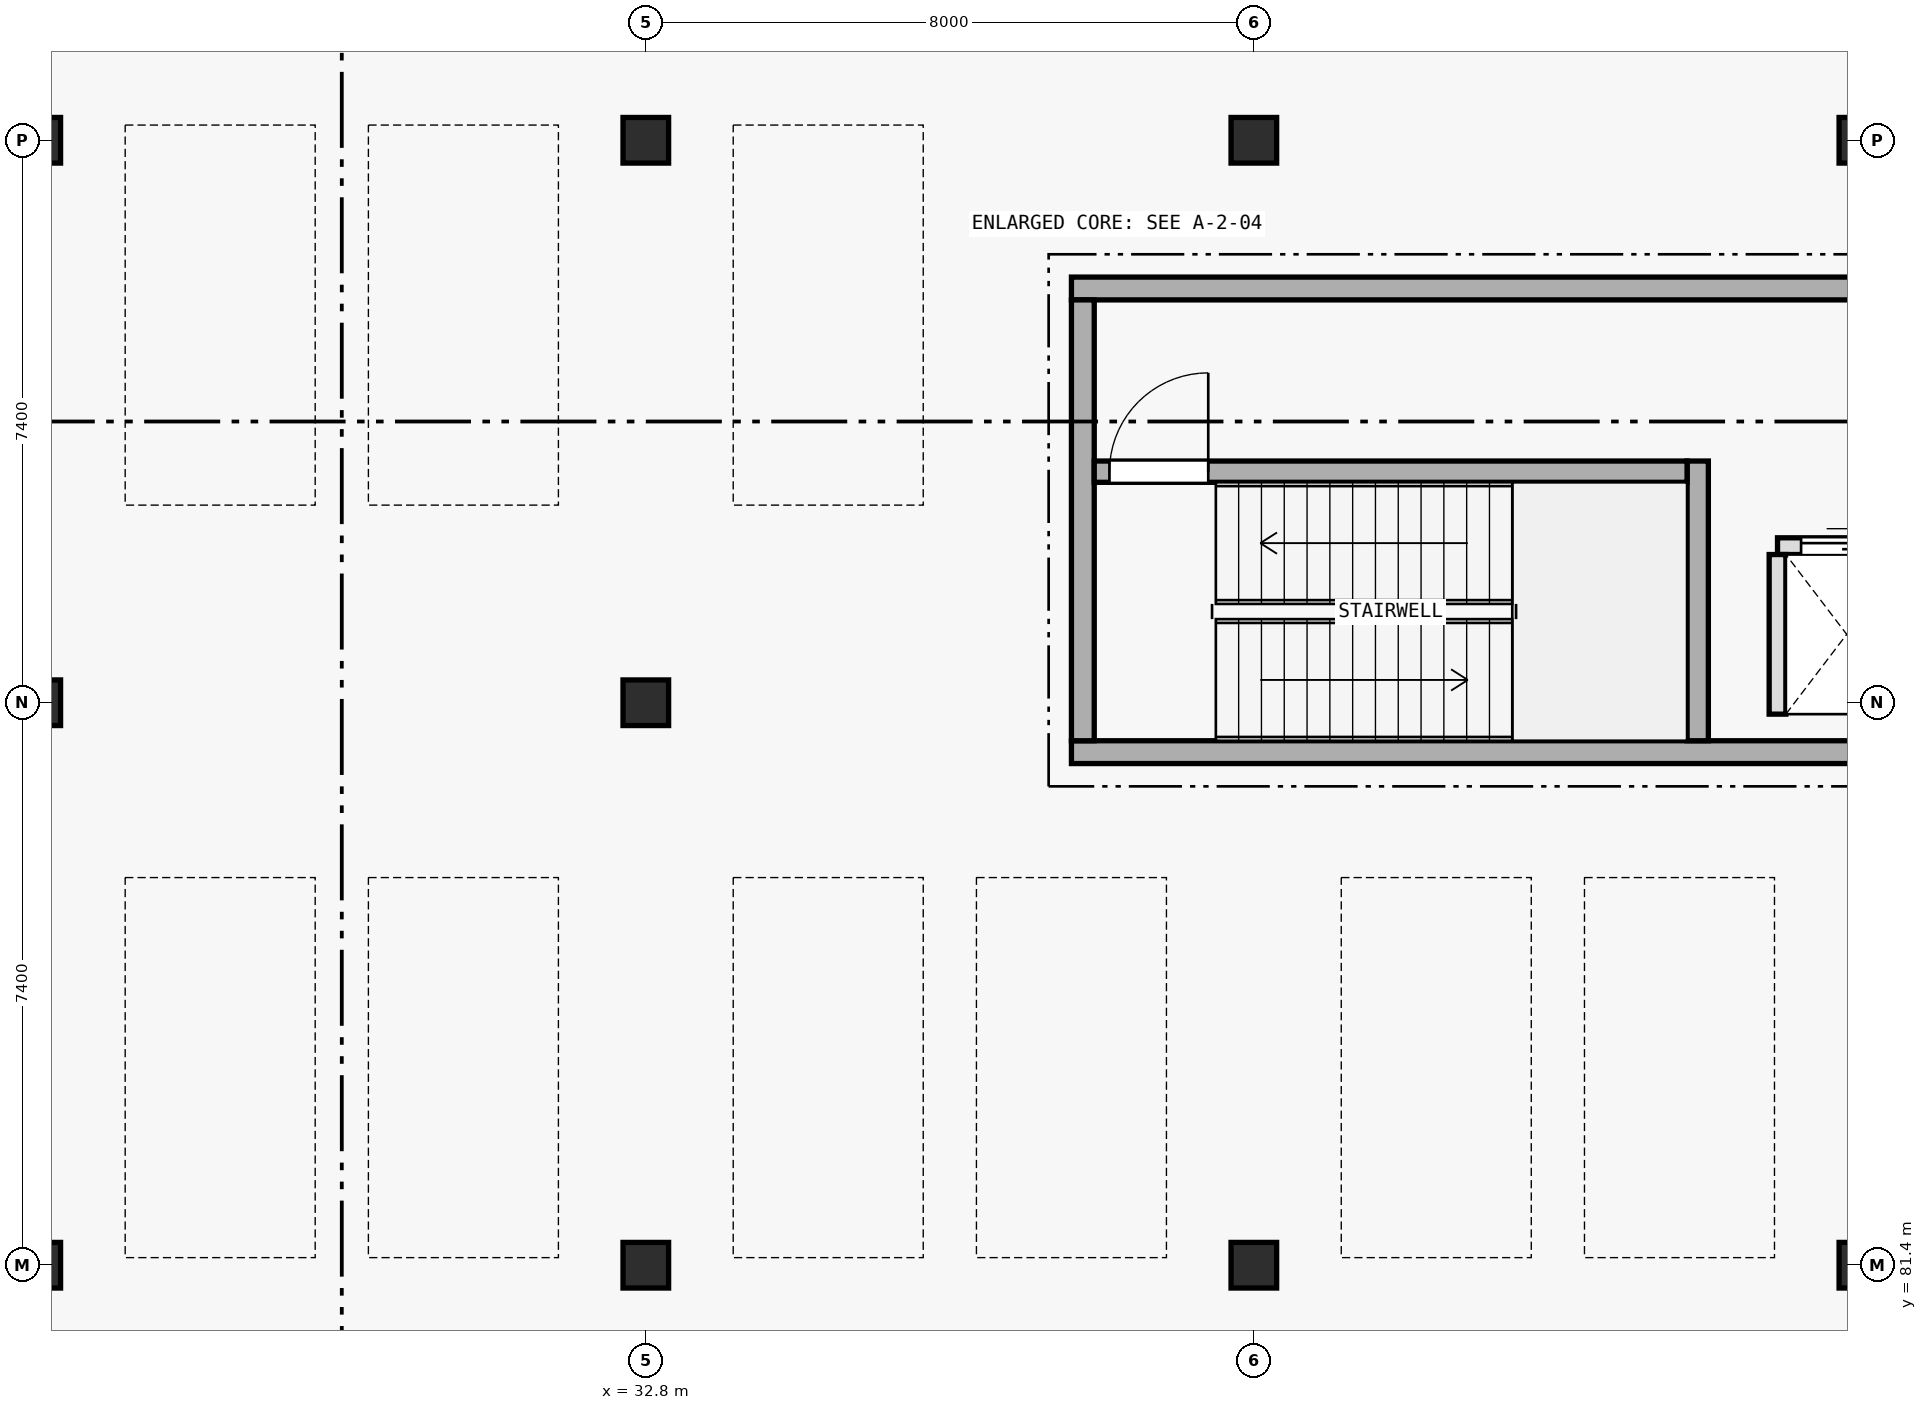
"""IFC4 building model, lengths in metres.
Left out: names, types, materials, properties, quantities, classifications, styles, units other than length and angle.
Written with IfcOpenShell. Run it as: python <this file> out.ifc"""

import sys

from ifc_helpers import new_model, si_unit, direction, frame, frame_2d, origin, origin_2d, place, context, subcontext, project, spatial, rectangle, extrude, element, fill, save


model = new_model("IFC4")
c1 = context("Model", 3, precision=1e-05, world=origin(), true_north=direction((0.0, 1.0)))
c2 = subcontext(c1, "Body", "Model", "MODEL_VIEW")
j1 = project(units=[si_unit("LENGTHUNIT", "METRE"), si_unit("PLANEANGLEUNIT", "RADIAN")], contexts=[c1])
p1 = place(None, origin())
s1 = spatial("IfcSite", under=j1, at=p1, CompositionType="ELEMENT")
p2 = place(p1, origin())
s2 = spatial("IfcBuilding", under=s1, at=p2, CompositionType="ELEMENT")
p3 = place(p2, frame((0.0, 0.0, -4.8)))
s3 = spatial("IfcBuildingStorey", under=s2, at=p3, CompositionType="ELEMENT", Elevation=-4.8)
p4 = place(p3, frame((38.4, 88.15, 0.0), z_axis=(0.0, 0.0, 1.0), x_axis=(1.0, 0.0, 0.0)))
e1 = element("IfcWall", 1, at=p4, inside=s3, PredefinedType="SHEAR", context=c2, shape_type="SweptSolid", body=[
    extrude(rectangle(XDim=16.0, YDim=0.3, at=frame_2d((8.0, 0.0))), origin(), (0.0, 0.0, 1.0), 4.795),
])
p5 = place(p4, frame((13.0, 0.0, 0.0)))
e2 = element("IfcOpeningElement", 2, at=p5, cuts=e1, PredefinedType="OPENING", context=c2, shape_type="SweptSolid", body=[
    extrude(rectangle(XDim=1.3, YDim=2.2, at=frame_2d((0.65, 1.1))), frame((0.0, 0.16, 0.0), z_axis=(0.0, -1.0, 0.0), x_axis=(1.0, 0.0, 0.0)), (0.0, 0.0, 1.0), 0.32),
])
p6 = place(p3, frame((38.4, 94.25, 0.0), z_axis=(0.0, 0.0, 1.0), x_axis=(1.0, 0.0, 0.0)))
e3 = element("IfcWall", 3, at=p6, inside=s3, PredefinedType="SHEAR", context=c2, shape_type="SweptSolid", body=[
    extrude(rectangle(XDim=16.0, YDim=0.3, at=frame_2d((8.0, 0.0))), origin(), (0.0, 0.0, 1.0), 4.795),
])
p7 = place(p3, frame((38.55, 88.3, 0.0), z_axis=(0.0, 0.0, 1.0), x_axis=(0.0, 1.0, 0.0)))
e4 = element("IfcWall", 4, at=p7, inside=s3, PredefinedType="SHEAR", context=c2, shape_type="SweptSolid", body=[
    extrude(rectangle(XDim=5.8, YDim=0.3, at=frame_2d((2.9, 0.0))), origin(), (0.0, 0.0, 1.0), 4.795),
])
p8 = place(p3, frame((46.64, 88.3, 0.0), z_axis=(0.0, 0.0, 1.0), x_axis=(0.0, 1.0, 0.0)))
e5 = element("IfcWall", 5, at=p8, inside=s3, PredefinedType="SHEAR", context=c2, shape_type="SweptSolid", body=[
    extrude(rectangle(XDim=3.68, YDim=0.28, at=frame_2d((1.84, 0.0))), origin(), (0.0, 0.0, 1.0), 4.795),
])
p9 = place(p3, frame((38.7, 91.84, 0.0), z_axis=(0.0, 0.0, 1.0), x_axis=(1.0, 0.0, 0.0)))
e6 = element("IfcWall", 6, at=p9, inside=s3, PredefinedType="SHEAR", context=c2, shape_type="SweptSolid", body=[
    extrude(rectangle(XDim=7.8, YDim=0.28, at=frame_2d((3.9, 0.0))), origin(), (0.0, 0.0, 1.0), 4.795),
])
p10 = place(p9, frame((0.2, 0.0, 0.0)))
e7 = element("IfcOpeningElement", 7, at=p10, cuts=e6, PredefinedType="OPENING", context=c2, shape_type="SweptSolid", body=[
    extrude(rectangle(XDim=1.3, YDim=2.2, at=frame_2d((0.65, 1.1))), frame((0.0, 0.15, 0.0), z_axis=(0.0, -1.0, 0.0), x_axis=(1.0, 0.0, 0.0)), (0.0, 0.0, 1.0), 0.3),
])
for number, where, z_axis, x_axis in (
    (8, (24.8, 81.4, 0.0), (0.0, 0.0, 1.0), (1.0, 0.0, 0.0)),
    (9, (24.8, 88.8, 0.0), (0.0, 0.0, 1.0), (1.0, 0.0, 0.0)),
    (10, (24.8, 96.2, 0.0), (0.0, 0.0, 1.0), (1.0, 0.0, 0.0)),
    (11, (32.8, 81.4, 0.0), (0.0, 0.0, 1.0), (1.0, 0.0, 0.0)),
    (12, (32.8, 88.8, 0.0), (0.0, 0.0, 1.0), (1.0, 0.0, 0.0)),
    (13, (32.8, 96.2, 0.0), (0.0, 0.0, 1.0), (1.0, 0.0, 0.0)),
    (14, (40.8, 81.4, 0.0), (0.0, 0.0, 1.0), (1.0, 0.0, 0.0)),
    (15, (40.8, 96.2, 0.0), (0.0, 0.0, 1.0), (1.0, 0.0, 0.0)),
    (16, (48.8, 81.4, 0.0), (0.0, 0.0, 1.0), (1.0, 0.0, 0.0)),
    (17, (48.8, 96.2, 0.0), (0.0, 0.0, 1.0), (1.0, 0.0, 0.0)),
):
    element("IfcColumn", number, at=place(p3, frame(where, z_axis=z_axis, x_axis=x_axis)), inside=s3, PredefinedType="COLUMN", context=c2, shape_type="SweptSolid", body=[
        extrude(rectangle(XDim=0.6, YDim=0.6, at=origin_2d()), origin(), (0.0, 0.0, 1.0), 4.8),
    ])
p11 = place(p3, frame((47.69, 90.86, 0.0), z_axis=(0.0, 0.0, 1.0), x_axis=(1.0, 0.0, 0.0)))
e18 = element("IfcWall", 18, at=p11, inside=s3, PredefinedType="PLUMBINGWALL", context=c2, shape_type="SweptSolid", body=[
    extrude(rectangle(XDim=1.82, YDim=0.22, at=frame_2d((0.91, 0.0))), origin(), (0.0, 0.0, 1.0), 4.38),
])
p12 = place(p11, frame((0.31, 0.0, 0.0)))
e19 = element("IfcOpeningElement", 19, at=p12, cuts=e18, PredefinedType="OPENING", context=c2, shape_type="SweptSolid", body=[
    extrude(rectangle(XDim=1.2, YDim=2.25, at=frame_2d((0.6, 1.125))), frame((0.0, 0.12, 0.0), z_axis=(0.0, -1.0, 0.0), x_axis=(1.0, 0.0, 0.0)), (0.0, 0.0, 1.0), 0.24),
])
p13 = place(p3, frame((47.69, 88.65, 0.0), z_axis=(0.0, 0.0, 1.0), x_axis=(0.0, 1.0, 0.0)))
e20 = element("IfcWall", 20, at=p13, inside=s3, PredefinedType="PLUMBINGWALL", context=c2, shape_type="SweptSolid", body=[
    extrude(rectangle(XDim=2.1, YDim=0.22, at=frame_2d((1.05, 0.0))), origin(), (0.0, 0.0, 1.0), 4.38),
])
p14 = place(p10, origin())
e21 = element("IfcDoor", 21, at=p14, inside=s3, OperationType="SINGLE_SWING_RIGHT", PredefinedType="DOOR", context=c2, shape_type="SweptSolid", body=[
    extrude(rectangle(XDim=1.3, YDim=2.2, at=frame_2d((0.65, 1.1))), frame((0.0, 0.025, 0.0), z_axis=(0.0, -1.0, 0.0), x_axis=(1.0, 0.0, 0.0)), (0.0, 0.0, 1.0), 0.05),
])
fill(e7, e21)
p15 = place(p12, origin())
e22 = element("IfcDoor", 22, at=p15, inside=s3, OperationType="DOUBLE_DOOR_SLIDING", PredefinedType="DOOR", context=c2, shape_type="SweptSolid", body=[
    extrude(rectangle(XDim=1.2, YDim=2.25, at=frame_2d((0.6, 1.125))), frame((0.0, 0.025, 0.0), z_axis=(0.0, -1.0, 0.0), x_axis=(1.0, 0.0, 0.0)), (0.0, 0.0, 1.0), 0.05),
])
fill(e19, e22)
save(model, sys.argv[1])
